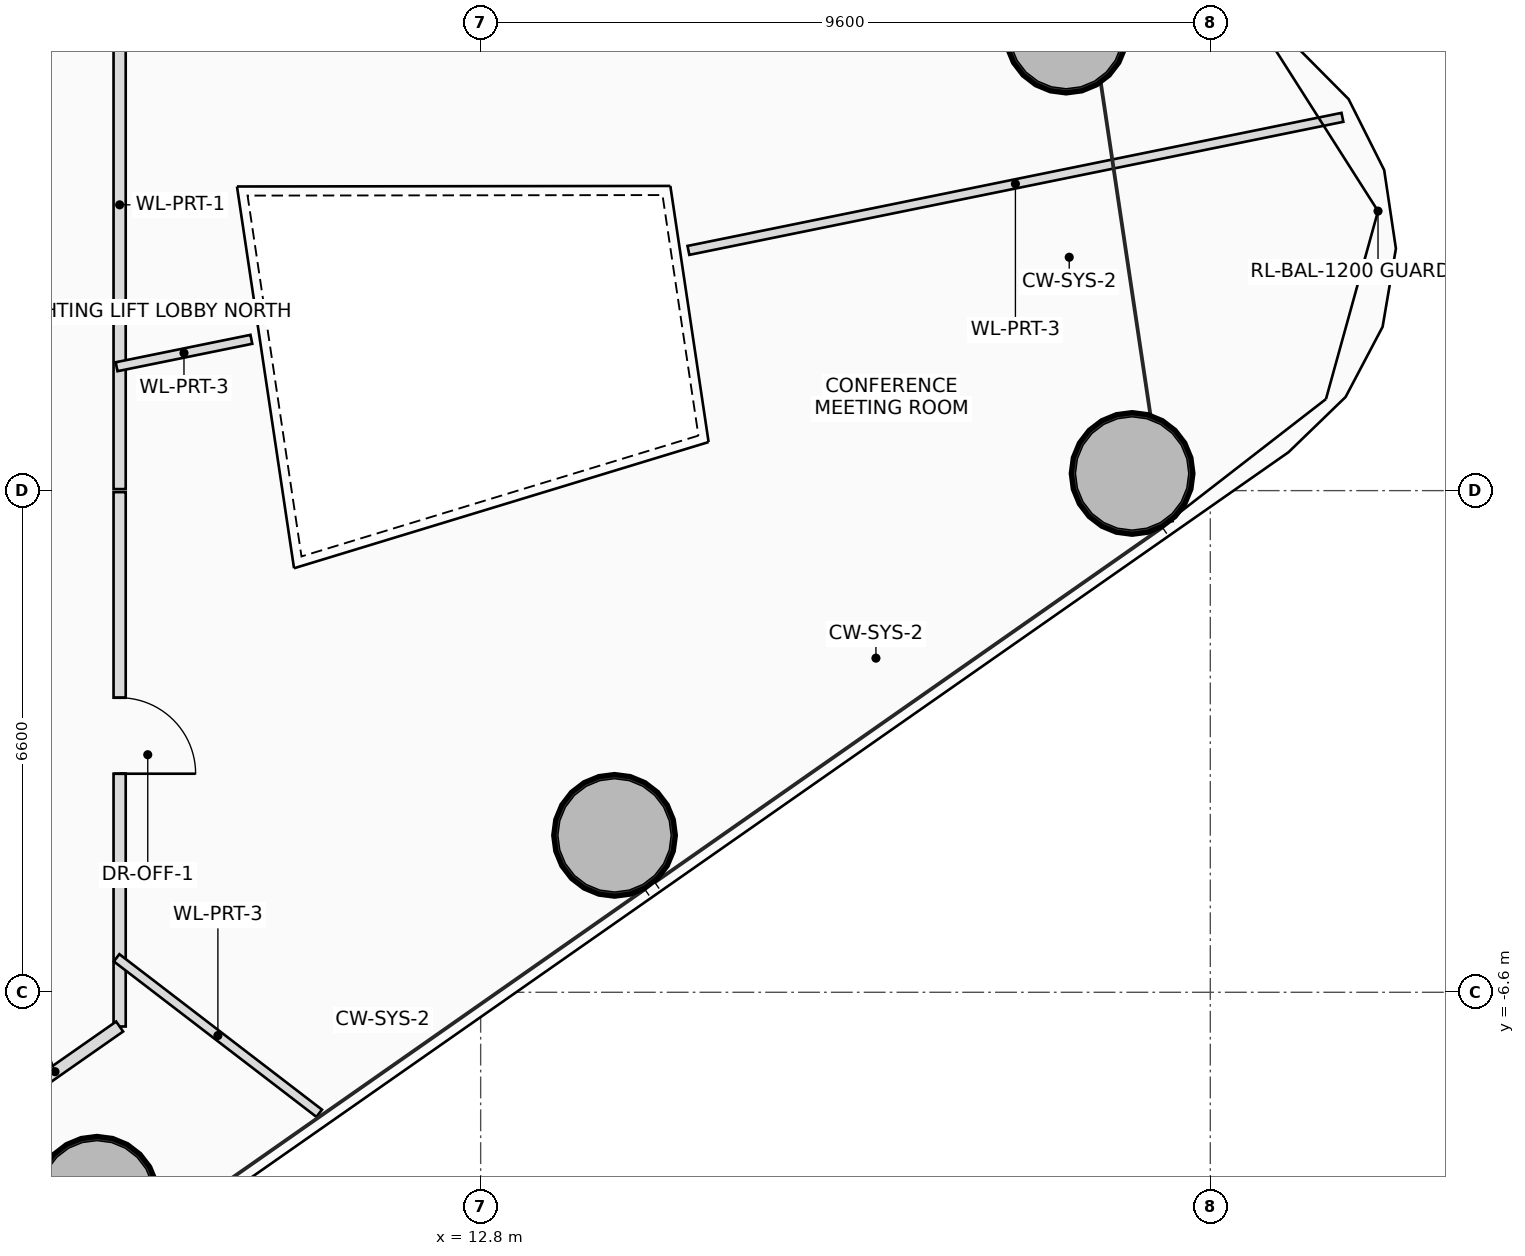
"""IFC4 building model, lengths in metres.
Left out: names, types, materials, properties, quantities, classifications, styles, units other than length and angle.
Written with IfcOpenShell. Run it as: python <this file> out.ifc"""

import sys

from ifc_helpers import new_model, si_unit, direction, frame, frame_2d, origin, origin_2d, place, context, subcontext, project, spatial, rectangle, hollow_circle, extrude, source, transform, mapped, element, fill, save


model = new_model("IFC4")
c1 = context("Model", 3, precision=1e-05, world=origin(), true_north=direction((0.0, 1.0)))
c2 = subcontext(c1, "Body", "Model", "MODEL_VIEW")
j1 = project(units=[si_unit("LENGTHUNIT", "METRE"), si_unit("PLANEANGLEUNIT", "RADIAN")], contexts=[c1])
p1 = place(None, origin())
s1 = spatial("IfcSite", under=j1, at=p1, CompositionType="ELEMENT")
p2 = place(p1, origin())
s2 = spatial("IfcBuilding", under=s1, at=p2, CompositionType="ELEMENT")
p3 = place(p2, frame((0.0, 0.0, 62.3)))
s3 = spatial("IfcBuildingStorey", under=s2, at=p3, CompositionType="ELEMENT", Elevation=62.3)
m1 = source(origin(), c2, "Body", "SweptSolid", [
    extrude(hollow_circle(Radius=0.8, WallThickness=0.055, at=origin_2d()), origin(), (0.0, 0.0, 1.0), 3.75),
])
for number, where, z_axis, x_axis in (
    (1, (7.752, -9.297, 0.0), (0.0, 0.0, 1.0), (1.0, 0.0, 0.0)),
    (2, (14.562, -4.535, 0.0), (0.0, 0.0, 1.0), (1.0, 0.0, 0.0)),
    (3, (21.371, 0.226, 0.0), (0.0, 0.0, 1.0), (1.0, 0.0, 0.0)),
    (4, (20.503, 6.032, 0.0), (0.0, 0.0, 1.0), (1.0, 0.0, 0.0)),
):
    element("IfcColumn", number, at=place(p3, frame(where, z_axis=z_axis, x_axis=x_axis)), inside=s3, PredefinedType="COLUMN", context=c2, shape_type="MappedRepresentation", body=[
        mapped(m1, transform((0.0, 0.0, 0.0), scale=1.0)),
    ])
p4 = place(p3, frame((8.05, 7.5, 0.0), z_axis=(0.0, 0.0, 1.0), x_axis=(0.0, -1.0, 0.0)))
e5 = element("IfcWall", 5, at=p4, inside=s3, PredefinedType="PARTITIONING", context=c2, shape_type="SweptSolid", body=[
    extrude(rectangle(XDim=7.48, YDim=0.16, at=frame_2d((3.74, 0.0))), origin(), (0.0, 0.0, 1.0), 2.85),
])
p5 = place(p3, frame((8.05, -0.02, 0.0), z_axis=(0.0, 0.0, 1.0), x_axis=(0.0, -1.0, 0.0)))
e6 = element("IfcWall", 6, at=p5, inside=s3, PredefinedType="PARTITIONING", context=c2, shape_type="SweptSolid", body=[
    extrude(rectangle(XDim=7.03, YDim=0.16, at=frame_2d((3.515, 0.0))), origin(), (0.0, 0.0, 1.0), 2.85),
])
p6 = place(p5, frame((2.705, 0.0, 0.0)))
e7 = element("IfcOpeningElement", 7, at=p6, cuts=e6, PredefinedType="OPENING", context=c2, shape_type="SweptSolid", body=[
    extrude(rectangle(XDim=1.0, YDim=2.25, at=frame_2d((0.5, 1.125))), frame((0.0, 0.09, 0.0), z_axis=(0.0, -1.0, 0.0), x_axis=(1.0, 0.0, 0.0)), (0.0, 0.0, 1.0), 0.18),
])
p7 = place(p3, frame((8.05, -7.05, 0.0), z_axis=(0.0, 0.0, 1.0), x_axis=(-0.819513816746, -0.573059424635, 0.0)))
e8 = element("IfcWall", 8, at=p7, inside=s3, PredefinedType="PARTITIONING", context=c2, shape_type="SweptSolid", body=[
    extrude(rectangle(XDim=2.074, YDim=0.16, at=frame_2d((1.037, 0.0))), origin(), (0.0, 0.0, 1.0), 2.85),
])
p8 = place(p3, frame((8.01, -6.146, 0.0), z_axis=(0.0, 0.0, 1.0), x_axis=(0.79333380799, -0.608786883153, 0.0)))
e9 = element("IfcWall", 9, at=p8, inside=s3, PredefinedType="PARTITIONING", context=c2, shape_type="SweptSolid", body=[
    extrude(rectangle(XDim=3.36, YDim=0.12, at=frame_2d((1.68, 0.0))), origin(), (0.0, 0.0, 1.0), 3.01),
])
p9 = place(p3, frame((8.01, 1.63, 0.0), z_axis=(0.0, 0.0, 1.0), x_axis=(0.979916112173, 0.199410162989, 0.0)))
e10 = element("IfcWall", 10, at=p9, inside=s3, PredefinedType="PARTITIONING", context=c2, shape_type="SweptSolid", body=[
    extrude(rectangle(XDim=1.81, YDim=0.12, at=frame_2d((0.905, 0.0))), origin(), (0.0, 0.0, 1.0), 3.21),
])
p10 = place(p3, frame((15.533, 3.16, 0.0), z_axis=(0.0, 0.0, 1.0), x_axis=(0.979928377953, 0.199349878562, 0.0)))
e11 = element("IfcWall", 11, at=p10, inside=s3, PredefinedType="PARTITIONING", context=c2, shape_type="SweptSolid", body=[
    extrude(rectangle(XDim=8.781, YDim=0.12, at=frame_2d((4.391, 0.0))), origin(), (0.0, 0.0, 1.0), 3.01),
])
p11 = place(p6, origin())
e12 = element("IfcDoor", 12, at=p11, inside=s3, OperationType="SINGLE_SWING_RIGHT", PredefinedType="DOOR", context=c2, shape_type="SweptSolid", body=[
    extrude(rectangle(XDim=1.0, YDim=2.25, at=frame_2d((0.5, 1.125))), frame((0.0, 0.025, 0.0), z_axis=(0.0, -1.0, 0.0), x_axis=(1.0, 0.0, 0.0)), (0.0, 0.0, 1.0), 0.05),
])
fill(e7, e12)
save(model, sys.argv[1])
